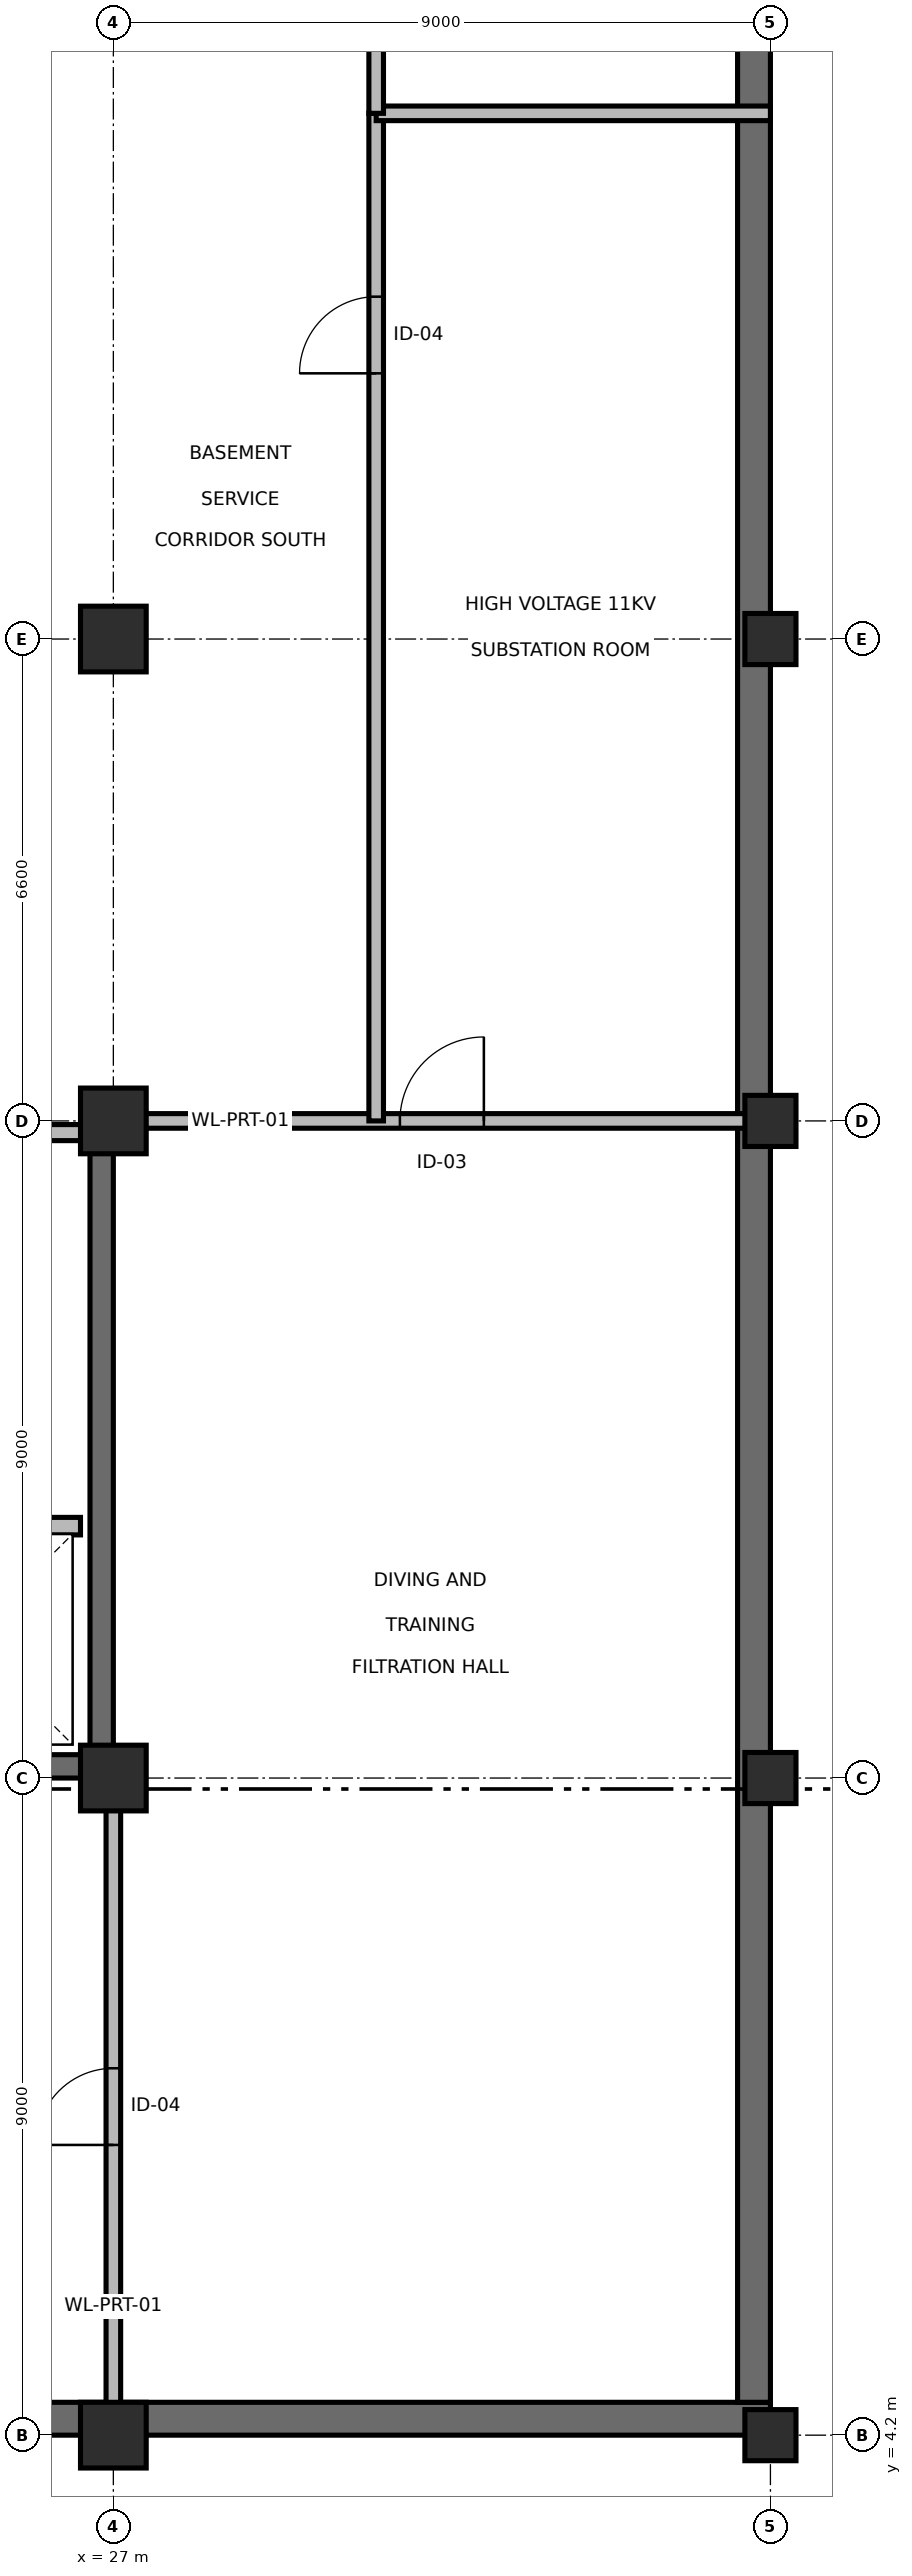
"""IFC4 building model, lengths in metres.
Left out: names, types, materials, properties, quantities, classifications, styles, units other than length and angle.
Written with IfcOpenShell. Run it as: python <this file> out.ifc"""

import sys

from ifc_helpers import new_model, si_unit, direction, frame, frame_2d, origin, origin_2d, place, context, subcontext, project, spatial, rectangle, extrude, element, fill, save


model = new_model("IFC4")
c1 = context("Model", 3, precision=1e-05, world=origin(), true_north=direction((0.0, 1.0)))
c2 = subcontext(c1, "Body", "Model", "MODEL_VIEW")
j1 = project(units=[si_unit("LENGTHUNIT", "METRE"), si_unit("PLANEANGLEUNIT", "RADIAN")], contexts=[c1])
p1 = place(None, origin())
s1 = spatial("IfcSite", under=j1, at=p1, CompositionType="ELEMENT")
p2 = place(p1, origin())
s2 = spatial("IfcBuilding", under=s1, at=p2, CompositionType="ELEMENT")
p3 = place(p2, frame((0.0, 0.0, -4.8)))
s3 = spatial("IfcBuildingStorey", under=s2, at=p3, CompositionType="ELEMENT", Elevation=-4.8)
for number, where, z_axis, x_axis in (
    (1, (27.0, 4.2, 0.0), (0.0, 0.0, 1.0), (1.0, 0.0, 0.0)),
    (2, (27.0, 13.2, 0.0), (0.0, 0.0, 1.0), (1.0, 0.0, 0.0)),
    (3, (27.0, 22.2, 0.0), (0.0, 0.0, 1.0), (1.0, 0.0, 0.0)),
    (4, (27.0, 28.8, 0.0), (0.0, 0.0, 1.0), (1.0, 0.0, 0.0)),
):
    element("IfcColumn", number, at=place(p3, frame(where, z_axis=z_axis, x_axis=x_axis)), inside=s3, PredefinedType="COLUMN", context=c2, shape_type="SweptSolid", body=[
        extrude(rectangle(XDim=0.9, YDim=0.9, at=origin_2d()), origin(), (0.0, 0.0, 1.0), 4.8),
    ])
for number, where, z_axis, x_axis in (
    (5, (36.0, 4.2, 0.0), (0.0, 0.0, 1.0), (1.0, 0.0, 0.0)),
    (6, (36.0, 13.2, 0.0), (0.0, 0.0, 1.0), (1.0, 0.0, 0.0)),
    (7, (36.0, 22.2, 0.0), (0.0, 0.0, 1.0), (1.0, 0.0, 0.0)),
    (8, (36.0, 28.8, 0.0), (0.0, 0.0, 1.0), (1.0, 0.0, 0.0)),
):
    element("IfcColumn", number, at=place(p3, frame(where, z_axis=z_axis, x_axis=x_axis)), inside=s3, PredefinedType="COLUMN", context=c2, shape_type="SweptSolid", body=[
        extrude(rectangle(XDim=0.7, YDim=0.7, at=origin_2d()), origin(), (0.0, 0.0, 1.0), 4.8),
    ])
p4 = place(p3, frame((0.0, 4.425, 0.0), z_axis=(0.0, 0.0, 1.0), x_axis=(1.0, 0.0, 0.0)))
e9 = element("IfcWall", 9, at=p4, inside=s3, PredefinedType="USERDEFINED", context=c2, shape_type="SweptSolid", body=[
    extrude(rectangle(XDim=36.0, YDim=0.45, at=frame_2d((18.0, 0.0))), origin(), (0.0, 0.0, 1.0), 4.5),
])
p5 = place(p3, frame((35.775, 4.65, 0.0), z_axis=(0.0, 0.0, 1.0), x_axis=(0.0, 1.0, 0.0)))
e10 = element("IfcWall", 10, at=p5, inside=s3, PredefinedType="USERDEFINED", context=c2, shape_type="SweptSolid", body=[
    extrude(rectangle(XDim=110.1, YDim=0.45, at=frame_2d((55.05, 0.0))), origin(), (0.0, 0.0, 1.0), 4.5),
])
p6 = place(p3, frame((9.0, 13.36, 0.0), z_axis=(0.0, 0.0, 1.0), x_axis=(1.0, 0.0, 0.0)))
e11 = element("IfcWall", 11, at=p6, inside=s3, PredefinedType="SHEAR", context=c2, shape_type="SweptSolid", body=[
    extrude(rectangle(XDim=18.0, YDim=0.32, at=frame_2d((9.0, 0.0))), origin(), (0.0, 0.0, 1.0), 4.8),
])
p7 = place(p3, frame((26.84, 13.52, 0.0), z_axis=(0.0, 0.0, 1.0), x_axis=(0.0, 1.0, 0.0)))
e12 = element("IfcWall", 12, at=p7, inside=s3, PredefinedType="SHEAR", context=c2, shape_type="SweptSolid", body=[
    extrude(rectangle(XDim=8.48, YDim=0.32, at=frame_2d((4.24, 0.0))), origin(), (0.0, 0.0, 1.0), 4.8),
])
p8 = place(p3, frame((23.45, 16.65, 0.0), z_axis=(0.0, 0.0, 1.0), x_axis=(1.0, 0.0, 0.0)))
e13 = element("IfcWall", 13, at=p8, inside=s3, PredefinedType="SOLIDWALL", context=c2, shape_type="SweptSolid", body=[
    extrude(rectangle(XDim=3.1, YDim=0.24, at=frame_2d((1.55, 0.0))), origin(), (0.0, 0.0, 1.0), 4.505),
])
p9 = place(p8, frame((0.95, 0.0, 0.0)))
e14 = element("IfcOpeningElement", 14, at=p9, cuts=e13, PredefinedType="OPENING", context=c2, shape_type="SweptSolid", body=[
    extrude(rectangle(XDim=1.2, YDim=2.2, at=frame_2d((0.6, 1.1))), frame((0.0, 0.13, 0.0), z_axis=(0.0, -1.0, 0.0), x_axis=(1.0, 0.0, 0.0)), (0.0, 0.0, 1.0), 0.26),
])
p10 = place(p3, frame((22.1, 22.04, 0.0), z_axis=(0.0, 0.0, 1.0), x_axis=(1.0, 0.0, 0.0)))
e15 = element("IfcWall", 15, at=p10, inside=s3, PredefinedType="PARTITIONING", context=c2, shape_type="SweptSolid", body=[
    extrude(rectangle(XDim=4.5, YDim=0.22, at=frame_2d((2.25, 0.0))), origin(), (0.0, 0.0, 1.0), 3.835),
])
p11 = place(p10, frame((1.1, 0.0, 0.0)))
e16 = element("IfcOpeningElement", 16, at=p11, cuts=e15, PredefinedType="OPENING", context=c2, shape_type="SweptSolid", body=[
    extrude(rectangle(XDim=1.8, YDim=2.2, at=frame_2d((0.9, 1.1))), frame((0.0, 0.12, 0.0), z_axis=(0.0, -1.0, 0.0), x_axis=(1.0, 0.0, 0.0)), (0.0, 0.0, 1.0), 0.24),
])
p12 = place(p3, frame((27.0, 4.2, 0.0), z_axis=(0.0, 0.0, 1.0), x_axis=(0.0, 1.0, 0.0)))
e17 = element("IfcWall", 17, at=p12, inside=s3, PredefinedType="PARTITIONING", context=c2, shape_type="SweptSolid", body=[
    extrude(rectangle(XDim=9.0, YDim=0.2, at=frame_2d((4.5, 0.0))), origin(), (0.0, 0.0, 1.0), 3.885),
])
p13 = place(p12, frame((3.975, 0.0, 0.0)))
e18 = element("IfcOpeningElement", 18, at=p13, cuts=e17, PredefinedType="OPENING", context=c2, shape_type="SweptSolid", body=[
    extrude(rectangle(XDim=1.05, YDim=2.15, at=frame_2d((0.525, 1.075))), frame((0.0, 0.11, 0.0), z_axis=(0.0, -1.0, 0.0), x_axis=(1.0, 0.0, 0.0)), (0.0, 0.0, 1.0), 0.22),
])
p14 = place(p3, frame((27.0, 22.2, 0.0), z_axis=(0.0, 0.0, 1.0), x_axis=(1.0, 0.0, 0.0)))
e19 = element("IfcWall", 19, at=p14, inside=s3, PredefinedType="PARTITIONING", context=c2, shape_type="SweptSolid", body=[
    extrude(rectangle(XDim=9.0, YDim=0.2, at=frame_2d((4.5, 0.0))), origin(), (0.0, 0.0, 1.0), 3.835),
])
p15 = place(p14, frame((3.925, 0.0, 0.0)))
e20 = element("IfcOpeningElement", 20, at=p15, cuts=e19, PredefinedType="OPENING", context=c2, shape_type="SweptSolid", body=[
    extrude(rectangle(XDim=1.15, YDim=2.2, at=frame_2d((0.575, 1.1))), frame((0.0, 0.11, 0.0), z_axis=(0.0, -1.0, 0.0), x_axis=(1.0, 0.0, 0.0)), (0.0, 0.0, 1.0), 0.22),
])
p16 = place(p3, frame((30.6, 22.2, 0.0), z_axis=(0.0, 0.0, 1.0), x_axis=(0.0, 1.0, 0.0)))
e21 = element("IfcWall", 21, at=p16, inside=s3, PredefinedType="PARTITIONING", context=c2, shape_type="SweptSolid", body=[
    extrude(rectangle(XDim=13.8, YDim=0.2, at=frame_2d((6.9, 0.0))), origin(), (0.0, 0.0, 1.0), 3.835),
])
p17 = place(p16, frame((10.239, 0.0, 0.0)))
e22 = element("IfcOpeningElement", 22, at=p17, cuts=e21, PredefinedType="OPENING", context=c2, shape_type="SweptSolid", body=[
    extrude(rectangle(XDim=1.05, YDim=2.15, at=frame_2d((0.525, 1.075))), frame((0.0, 0.11, 0.0), z_axis=(0.0, -1.0, 0.0), x_axis=(1.0, 0.0, 0.0)), (0.0, 0.0, 1.0), 0.22),
])
p18 = place(p3, frame((30.6, 36.0, 0.0), z_axis=(0.0, 0.0, 1.0), x_axis=(1.0, 0.0, 0.0)))
e23 = element("IfcWall", 23, at=p18, inside=s3, PredefinedType="PARTITIONING", context=c2, shape_type="SweptSolid", body=[
    extrude(rectangle(XDim=5.4, YDim=0.2, at=frame_2d((2.7, 0.0))), origin(), (0.0, 0.0, 1.0), 3.735),
])
p19 = place(p3, frame((30.6, 36.0, 0.0), z_axis=(0.0, 0.0, 1.0), x_axis=(0.0, 1.0, 0.0)))
e24 = element("IfcWall", 24, at=p19, inside=s3, PredefinedType="PARTITIONING", context=c2, shape_type="SweptSolid", body=[
    extrude(rectangle(XDim=13.2, YDim=0.2, at=frame_2d((6.6, 0.0))), origin(), (0.0, 0.0, 1.0), 3.835),
])
p20 = place(p19, frame((7.609, 0.0, 0.0)))
e25 = element("IfcOpeningElement", 25, at=p20, cuts=e24, PredefinedType="OPENING", context=c2, shape_type="SweptSolid", body=[
    extrude(rectangle(XDim=1.15, YDim=2.2, at=frame_2d((0.575, 1.1))), frame((0.0, 0.11, 0.0), z_axis=(0.0, -1.0, 0.0), x_axis=(1.0, 0.0, 0.0)), (0.0, 0.0, 1.0), 0.22),
])
p21 = place(p13, origin())
e26 = element("IfcDoor", 26, at=p21, inside=s3, OperationType="SINGLE_SWING_LEFT", PredefinedType="DOOR", context=c2, shape_type="SweptSolid", body=[
    extrude(rectangle(XDim=1.05, YDim=2.15, at=frame_2d((0.525, 1.075))), frame((0.0, 0.025, 0.0), z_axis=(0.0, -1.0, 0.0), x_axis=(1.0, 0.0, 0.0)), (0.0, 0.0, 1.0), 0.05),
])
fill(e18, e26)
p22 = place(p15, origin())
e27 = element("IfcDoor", 27, at=p22, inside=s3, OperationType="SINGLE_SWING_RIGHT", PredefinedType="DOOR", context=c2, shape_type="SweptSolid", body=[
    extrude(rectangle(XDim=1.15, YDim=2.2, at=frame_2d((0.575, 1.1))), frame((0.0, 0.025, 0.0), z_axis=(0.0, -1.0, 0.0), x_axis=(1.0, 0.0, 0.0)), (0.0, 0.0, 1.0), 0.05),
])
fill(e20, e27)
p23 = place(p17, origin())
e28 = element("IfcDoor", 28, at=p23, inside=s3, OperationType="SINGLE_SWING_LEFT", PredefinedType="DOOR", context=c2, shape_type="SweptSolid", body=[
    extrude(rectangle(XDim=1.05, YDim=2.15, at=frame_2d((0.525, 1.075))), frame((0.0, 0.025, 0.0), z_axis=(0.0, -1.0, 0.0), x_axis=(1.0, 0.0, 0.0)), (0.0, 0.0, 1.0), 0.05),
])
fill(e22, e28)
save(model, sys.argv[1])
